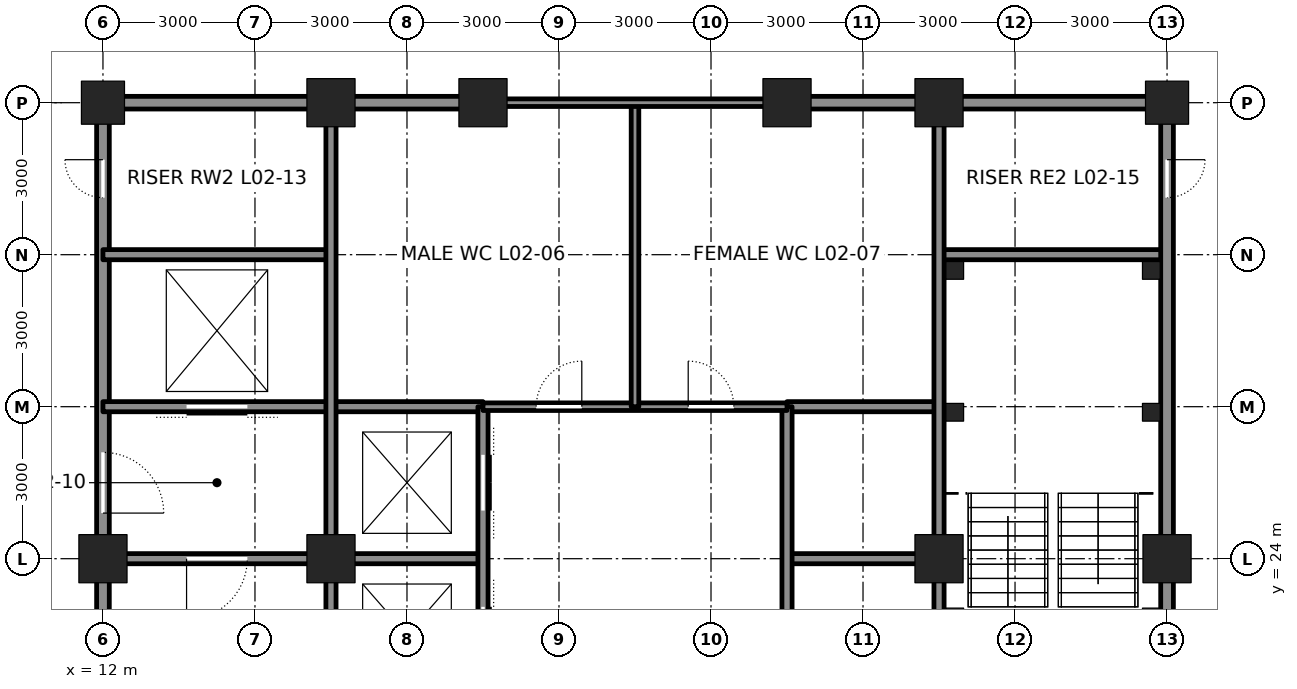
"""IFC4 building model, lengths in metres.
Left out: names, types, materials, properties, quantities, classifications, styles, units other than length and angle.
Written with IfcOpenShell. Run it as: python <this file> out.ifc"""

import sys

from ifc_helpers import new_model, si_unit, direction, frame, frame_2d, origin, origin_2d, place, context, subcontext, project, spatial, rectangle, hollow_rectangle, extrude, element, fill, save


model = new_model("IFC4")
c1 = context("Model", 3, precision=1e-05, world=origin(), true_north=direction((0.0, 1.0)))
c2 = subcontext(c1, "Body", "Model", "MODEL_VIEW")
j1 = project(units=[si_unit("LENGTHUNIT", "METRE"), si_unit("PLANEANGLEUNIT", "RADIAN")], contexts=[c1])
p1 = place(None, origin())
s1 = spatial("IfcSite", under=j1, at=p1, CompositionType="ELEMENT")
p2 = place(p1, origin())
s2 = spatial("IfcBuilding", under=s1, at=p2, CompositionType="ELEMENT")
p3 = place(p2, frame((0.0, 0.0, 13.5)))
s3 = spatial("IfcBuildingStorey", under=s2, at=p3, CompositionType="ELEMENT", Elevation=13.5)
p4 = place(p3, frame((12.0, 33.0, 0.0), z_axis=(0.0, 0.0, 1.0), x_axis=(1.0, 0.0, 0.0)))
e1 = element("IfcColumn", 1, at=p4, inside=s3, PredefinedType="COLUMN", context=c2, shape_type="SweptSolid", body=[
    extrude(hollow_rectangle(XDim=0.85, YDim=0.85, WallThickness=0.085, at=origin_2d()), origin(), (0.0, 0.0, 1.0), 6.0),
])
for number, where, z_axis, x_axis in (
    (2, (16.5, 33.0, 0.0), (0.0, 0.0, 1.0), (1.0, 0.0, 0.0)),
    (3, (19.5, 33.0, 0.0), (0.0, 0.0, 1.0), (1.0, 0.0, 0.0)),
    (4, (25.5, 33.0, 0.0), (0.0, 0.0, 1.0), (1.0, 0.0, 0.0)),
    (5, (28.5, 33.0, 0.0), (0.0, 0.0, 1.0), (1.0, 0.0, 0.0)),
):
    element("IfcColumn", number, at=place(p3, frame(where, z_axis=z_axis, x_axis=x_axis)), inside=s3, PredefinedType="COLUMN", context=c2, shape_type="SweptSolid", body=[
        extrude(hollow_rectangle(XDim=0.95, YDim=0.95, WallThickness=0.095, at=origin_2d()), origin(), (0.0, 0.0, 1.0), 6.0),
    ])
p5 = place(p3, frame((33.0, 33.0, 0.0), z_axis=(0.0, 0.0, 1.0), x_axis=(1.0, 0.0, 0.0)))
e6 = element("IfcColumn", 6, at=p5, inside=s3, PredefinedType="COLUMN", context=c2, shape_type="SweptSolid", body=[
    extrude(hollow_rectangle(XDim=0.85, YDim=0.85, WallThickness=0.085, at=origin_2d()), origin(), (0.0, 0.0, 1.0), 6.0),
])
for number, where, z_axis, x_axis in (
    (7, (12.0, 24.0, 0.0), (0.0, 0.0, 1.0), (1.0, 0.0, 0.0)),
    (8, (33.0, 24.0, 0.0), (0.0, 0.0, 1.0), (1.0, 0.0, 0.0)),
    (9, (16.5, 24.0, 0.0), (0.0, 0.0, 1.0), (1.0, 0.0, 0.0)),
    (10, (28.5, 24.0, 0.0), (0.0, 0.0, 1.0), (1.0, 0.0, 0.0)),
):
    element("IfcColumn", number, at=place(p3, frame(where, z_axis=z_axis, x_axis=x_axis)), inside=s3, PredefinedType="COLUMN", context=c2, shape_type="SweptSolid", body=[
        extrude(hollow_rectangle(XDim=0.95, YDim=0.95, WallThickness=0.095, at=origin_2d()), origin(), (0.0, 0.0, 1.0), 6.0),
    ])
p6 = place(p3, frame((12.0, 21.25, 0.0), z_axis=(0.0, 0.0, 1.0), x_axis=(0.0, 1.0, 0.0)))
e11 = element("IfcWall", 11, at=p6, inside=s3, PredefinedType="SOLIDWALL", context=c2, shape_type="SweptSolid", body=[
    extrude(rectangle(XDim=2.5, YDim=0.25, at=frame_2d((1.25, 0.0))), origin(), (0.0, 0.0, 1.0), 4.873),
])
p7 = place(p3, frame((12.0, 24.25, 0.0), z_axis=(0.0, 0.0, 1.0), x_axis=(0.0, 1.0, 0.0)))
e12 = element("IfcWall", 12, at=p7, inside=s3, PredefinedType="SOLIDWALL", context=c2, shape_type="SweptSolid", body=[
    extrude(rectangle(XDim=8.5, YDim=0.25, at=frame_2d((4.25, 0.0))), origin(), (0.0, 0.0, 1.0), 4.873),
])
p8 = place(p7, frame((0.65, 0.0, 0.0)))
e13 = element("IfcOpeningElement", 13, at=p8, cuts=e12, PredefinedType="OPENING", context=c2, shape_type="SweptSolid", body=[
    extrude(rectangle(XDim=1.2, YDim=2.1, at=frame_2d((0.6, 1.05))), frame((0.0, 0.135, 0.0), z_axis=(0.0, -1.0, 0.0), x_axis=(1.0, 0.0, 0.0)), (0.0, 0.0, 1.0), 0.27),
])
p9 = place(p7, frame((6.875, 0.0, 0.0)))
e14 = element("IfcOpeningElement", 14, at=p9, cuts=e12, PredefinedType="OPENING", context=c2, shape_type="SweptSolid", body=[
    extrude(rectangle(XDim=0.75, YDim=2.1, at=frame_2d((0.375, 1.05))), frame((0.0, 0.135, 0.0), z_axis=(0.0, -1.0, 0.0), x_axis=(1.0, 0.0, 0.0)), (0.0, 0.0, 1.0), 0.27),
])
p10 = place(p3, frame((12.25, 24.0, 0.0), z_axis=(0.0, 0.0, 1.0), x_axis=(1.0, 0.0, 0.0)))
e15 = element("IfcWall", 15, at=p10, inside=s3, PredefinedType="SOLIDWALL", context=c2, shape_type="SweptSolid", body=[
    extrude(rectangle(XDim=4.0, YDim=0.2, at=frame_2d((2.0, 0.0))), origin(), (0.0, 0.0, 1.0), 4.85),
])
p11 = place(p10, frame((1.4, 0.0, 0.0)))
e16 = element("IfcOpeningElement", 16, at=p11, cuts=e15, PredefinedType="OPENING", context=c2, shape_type="SweptSolid", body=[
    extrude(rectangle(XDim=1.2, YDim=2.1, at=frame_2d((0.6, 1.05))), frame((0.0, 0.11, 0.0), z_axis=(0.0, -1.0, 0.0), x_axis=(1.0, 0.0, 0.0)), (0.0, 0.0, 1.0), 0.22),
])
for number, where, z_axis, x_axis in (
    (17, (16.75, 24.0, 0.0), (0.0, 0.0, 1.0), (1.0, 0.0, 0.0)),
    (18, (25.5, 24.0, 0.0), (0.0, 0.0, 1.0), (1.0, 0.0, 0.0)),
):
    element("IfcWall", number, at=place(p3, frame(where, z_axis=z_axis, x_axis=x_axis)), inside=s3, PredefinedType="SOLIDWALL", context=c2, shape_type="SweptSolid", body=[
        extrude(rectangle(XDim=2.75, YDim=0.2, at=frame_2d((1.375, 0.0))), origin(), (0.0, 0.0, 1.0), 4.85),
    ])
p12 = place(p3, frame((12.0, 27.0, 0.0), z_axis=(0.0, 0.0, 1.0), x_axis=(1.0, 0.0, 0.0)))
e19 = element("IfcWall", 19, at=p12, inside=s3, PredefinedType="SOLIDWALL", context=c2, shape_type="SweptSolid", body=[
    extrude(rectangle(XDim=7.5, YDim=0.2, at=frame_2d((3.75, 0.0))), origin(), (0.0, 0.0, 1.0), 5.8),
])
p13 = place(p12, frame((1.65, 0.0, 0.0)))
e20 = element("IfcOpeningElement", 20, at=p13, cuts=e19, PredefinedType="OPENING", context=c2, shape_type="SweptSolid", body=[
    extrude(rectangle(XDim=1.2, YDim=2.1, at=frame_2d((0.6, 1.05))), frame((0.0, 0.11, 0.0), z_axis=(0.0, -1.0, 0.0), x_axis=(1.0, 0.0, 0.0)), (0.0, 0.0, 1.0), 0.22),
])
p14 = place(p3, frame((25.5, 27.0, 0.0), z_axis=(0.0, 0.0, 1.0), x_axis=(1.0, 0.0, 0.0)))
e21 = element("IfcWall", 21, at=p14, inside=s3, PredefinedType="SOLIDWALL", context=c2, shape_type="SweptSolid", body=[
    extrude(rectangle(XDim=3.0, YDim=0.2, at=frame_2d((1.5, 0.0))), origin(), (0.0, 0.0, 1.0), 5.8),
])
for number, where, z_axis, x_axis in (
    (22, (12.0, 30.0, 0.0), (0.0, 0.0, 1.0), (1.0, 0.0, 0.0)),
    (23, (28.5, 30.0, 0.0), (0.0, 0.0, 1.0), (1.0, 0.0, 0.0)),
):
    element("IfcWall", number, at=place(p3, frame(where, z_axis=z_axis, x_axis=x_axis)), inside=s3, PredefinedType="SOLIDWALL", context=c2, shape_type="SweptSolid", body=[
        extrude(rectangle(XDim=4.5, YDim=0.2, at=frame_2d((2.25, 0.0))), origin(), (0.0, 0.0, 1.0), 5.8),
    ])
p15 = place(p3, frame((12.25, 33.0, 0.0), z_axis=(0.0, 0.0, 1.0), x_axis=(1.0, 0.0, 0.0)))
e24 = element("IfcWall", 24, at=p15, inside=s3, PredefinedType="SOLIDWALL", context=c2, shape_type="SweptSolid", body=[
    extrude(rectangle(XDim=4.0, YDim=0.25, at=frame_2d((2.0, 0.0))), origin(), (0.0, 0.0, 1.0), 4.941),
])
for number, where, z_axis, x_axis in (
    (25, (16.75, 33.0, 0.0), (0.0, 0.0, 1.0), (1.0, 0.0, 0.0)),
    (26, (25.75, 33.0, 0.0), (0.0, 0.0, 1.0), (1.0, 0.0, 0.0)),
):
    element("IfcWall", number, at=place(p3, frame(where, z_axis=z_axis, x_axis=x_axis)), inside=s3, PredefinedType="SOLIDWALL", context=c2, shape_type="SweptSolid", body=[
        extrude(rectangle(XDim=2.5, YDim=0.25, at=frame_2d((1.25, 0.0))), origin(), (0.0, 0.0, 1.0), 4.941),
    ])
p16 = place(p3, frame((28.75, 33.0, 0.0), z_axis=(0.0, 0.0, 1.0), x_axis=(1.0, 0.0, 0.0)))
e27 = element("IfcWall", 27, at=p16, inside=s3, PredefinedType="SOLIDWALL", context=c2, shape_type="SweptSolid", body=[
    extrude(rectangle(XDim=4.0, YDim=0.25, at=frame_2d((2.0, 0.0))), origin(), (0.0, 0.0, 1.0), 4.941),
])
p17 = place(p3, frame((16.5, 21.25, 0.0), z_axis=(0.0, 0.0, 1.0), x_axis=(0.0, 1.0, 0.0)))
e28 = element("IfcWall", 28, at=p17, inside=s3, PredefinedType="SOLIDWALL", context=c2, shape_type="SweptSolid", body=[
    extrude(rectangle(XDim=2.5, YDim=0.2, at=frame_2d((1.25, 0.0))), origin(), (0.0, 0.0, 1.0), 4.873),
])
p18 = place(p3, frame((16.5, 24.25, 0.0), z_axis=(0.0, 0.0, 1.0), x_axis=(0.0, 1.0, 0.0)))
e29 = element("IfcWall", 29, at=p18, inside=s3, PredefinedType="SOLIDWALL", context=c2, shape_type="SweptSolid", body=[
    extrude(rectangle(XDim=8.5, YDim=0.2, at=frame_2d((4.25, 0.0))), origin(), (0.0, 0.0, 1.0), 4.873),
])
p19 = place(p3, frame((19.5, 15.0, 0.0), z_axis=(0.0, 0.0, 1.0), x_axis=(0.0, 1.0, 0.0)))
e30 = element("IfcWall", 30, at=p19, inside=s3, PredefinedType="SOLIDWALL", context=c2, shape_type="SweptSolid", body=[
    extrude(rectangle(XDim=12.0, YDim=0.2, at=frame_2d((6.0, 0.0))), origin(), (0.0, 0.0, 1.0), 4.825),
])
p20 = place(p19, frame((0.95, 0.0, 0.0)))
e31 = element("IfcOpeningElement", 31, at=p20, cuts=e30, PredefinedType="OPENING", context=c2, shape_type="SweptSolid", body=[
    extrude(rectangle(XDim=1.1, YDim=2.1, at=frame_2d((0.55, 1.05))), frame((0.0, 0.11, 0.0), z_axis=(0.0, -1.0, 0.0), x_axis=(1.0, 0.0, 0.0)), (0.0, 0.0, 1.0), 0.22),
])
p21 = place(p19, frame((3.95, 0.0, 0.0)))
e32 = element("IfcOpeningElement", 32, at=p21, cuts=e30, PredefinedType="OPENING", context=c2, shape_type="SweptSolid", body=[
    extrude(rectangle(XDim=1.1, YDim=2.1, at=frame_2d((0.55, 1.05))), frame((0.0, 0.11, 0.0), z_axis=(0.0, -1.0, 0.0), x_axis=(1.0, 0.0, 0.0)), (0.0, 0.0, 1.0), 0.22),
])
p22 = place(p19, frame((6.95, 0.0, 0.0)))
e33 = element("IfcOpeningElement", 33, at=p22, cuts=e30, PredefinedType="OPENING", context=c2, shape_type="SweptSolid", body=[
    extrude(rectangle(XDim=1.1, YDim=2.1, at=frame_2d((0.55, 1.05))), frame((0.0, 0.11, 0.0), z_axis=(0.0, -1.0, 0.0), x_axis=(1.0, 0.0, 0.0)), (0.0, 0.0, 1.0), 0.22),
])
p23 = place(p19, frame((9.95, 0.0, 0.0)))
e34 = element("IfcOpeningElement", 34, at=p23, cuts=e30, PredefinedType="OPENING", context=c2, shape_type="SweptSolid", body=[
    extrude(rectangle(XDim=1.1, YDim=2.1, at=frame_2d((0.55, 1.05))), frame((0.0, 0.11, 0.0), z_axis=(0.0, -1.0, 0.0), x_axis=(1.0, 0.0, 0.0)), (0.0, 0.0, 1.0), 0.22),
])
p24 = place(p3, frame((25.5, 15.0, 0.0), z_axis=(0.0, 0.0, 1.0), x_axis=(0.0, 1.0, 0.0)))
e35 = element("IfcWall", 35, at=p24, inside=s3, PredefinedType="SOLIDWALL", context=c2, shape_type="SweptSolid", body=[
    extrude(rectangle(XDim=12.0, YDim=0.2, at=frame_2d((6.0, 0.0))), origin(), (0.0, 0.0, 1.0), 4.825),
])
p25 = place(p3, frame((28.5, 21.25, 0.0), z_axis=(0.0, 0.0, 1.0), x_axis=(0.0, 1.0, 0.0)))
e36 = element("IfcWall", 36, at=p25, inside=s3, PredefinedType="SOLIDWALL", context=c2, shape_type="SweptSolid", body=[
    extrude(rectangle(XDim=2.5, YDim=0.2, at=frame_2d((1.25, 0.0))), origin(), (0.0, 0.0, 1.0), 4.873),
])
p26 = place(p3, frame((28.5, 24.25, 0.0), z_axis=(0.0, 0.0, 1.0), x_axis=(0.0, 1.0, 0.0)))
e37 = element("IfcWall", 37, at=p26, inside=s3, PredefinedType="SOLIDWALL", context=c2, shape_type="SweptSolid", body=[
    extrude(rectangle(XDim=8.5, YDim=0.2, at=frame_2d((4.25, 0.0))), origin(), (0.0, 0.0, 1.0), 4.873),
])
p27 = place(p3, frame((33.0, 21.25, 0.0), z_axis=(0.0, 0.0, 1.0), x_axis=(0.0, 1.0, 0.0)))
e38 = element("IfcWall", 38, at=p27, inside=s3, PredefinedType="SOLIDWALL", context=c2, shape_type="SweptSolid", body=[
    extrude(rectangle(XDim=2.5, YDim=0.25, at=frame_2d((1.25, 0.0))), origin(), (0.0, 0.0, 1.0), 4.873),
])
p28 = place(p3, frame((33.0, 24.25, 0.0), z_axis=(0.0, 0.0, 1.0), x_axis=(0.0, 1.0, 0.0)))
e39 = element("IfcWall", 39, at=p28, inside=s3, PredefinedType="SOLIDWALL", context=c2, shape_type="SweptSolid", body=[
    extrude(rectangle(XDim=8.5, YDim=0.25, at=frame_2d((4.25, 0.0))), origin(), (0.0, 0.0, 1.0), 4.873),
])
p29 = place(p28, frame((6.875, 0.0, 0.0)))
e40 = element("IfcOpeningElement", 40, at=p29, cuts=e39, PredefinedType="OPENING", context=c2, shape_type="SweptSolid", body=[
    extrude(rectangle(XDim=0.75, YDim=2.1, at=frame_2d((0.375, 1.05))), frame((0.0, 0.135, 0.0), z_axis=(0.0, -1.0, 0.0), x_axis=(1.0, 0.0, 0.0)), (0.0, 0.0, 1.0), 0.27),
])
p30 = place(p3, frame((19.5, 27.0, 0.0), z_axis=(0.0, 0.0, 1.0), x_axis=(1.0, 0.0, 0.0)))
e41 = element("IfcWall", 41, at=p30, inside=s3, PredefinedType="PARTITIONING", context=c2, shape_type="SweptSolid", body=[
    extrude(rectangle(XDim=6.0, YDim=0.15, at=frame_2d((3.0, 0.0))), origin(), (0.0, 0.0, 1.0), 5.8),
])
p31 = place(p30, frame((1.05, 0.0, 0.0)))
e42 = element("IfcOpeningElement", 42, at=p31, cuts=e41, PredefinedType="OPENING", context=c2, shape_type="SweptSolid", body=[
    extrude(rectangle(XDim=0.9, YDim=2.1, at=frame_2d((0.45, 1.05))), frame((0.0, 0.085, 0.0), z_axis=(0.0, -1.0, 0.0), x_axis=(1.0, 0.0, 0.0)), (0.0, 0.0, 1.0), 0.17),
])
p32 = place(p30, frame((4.05, 0.0, 0.0)))
e43 = element("IfcOpeningElement", 43, at=p32, cuts=e41, PredefinedType="OPENING", context=c2, shape_type="SweptSolid", body=[
    extrude(rectangle(XDim=0.9, YDim=2.1, at=frame_2d((0.45, 1.05))), frame((0.0, 0.085, 0.0), z_axis=(0.0, -1.0, 0.0), x_axis=(1.0, 0.0, 0.0)), (0.0, 0.0, 1.0), 0.17),
])
p33 = place(p3, frame((22.5, 27.0, 0.0), z_axis=(0.0, 0.0, 1.0), x_axis=(0.0, 1.0, 0.0)))
e44 = element("IfcWall", 44, at=p33, inside=s3, PredefinedType="PARTITIONING", context=c2, shape_type="SweptSolid", body=[
    extrude(rectangle(XDim=6.0, YDim=0.15, at=frame_2d((3.0, 0.0))), origin(), (0.0, 0.0, 1.0), 5.8),
])
p34 = place(p3, frame((19.5, 33.0, 0.0), z_axis=(0.0, 0.0, 1.0), x_axis=(1.0, 0.0, 0.0)))
e45 = element("IfcWall", 45, at=p34, inside=s3, PredefinedType="PARTITIONING", context=c2, shape_type="SweptSolid", body=[
    extrude(rectangle(XDim=6.0, YDim=0.15, at=frame_2d((3.0, 0.0))), origin(), (0.0, 0.0, 1.0), 4.941),
])
for number, where, z_axis, x_axis in (
    (46, (28.81, 29.69, 0.0), (0.0, 0.0, 1.0), (1.0, 0.0, 0.0)),
    (47, (32.69, 29.69, 0.0), (0.0, 0.0, 1.0), (1.0, 0.0, 0.0)),
    (48, (28.81, 26.89, 0.0), (0.0, 0.0, 1.0), (1.0, 0.0, 0.0)),
    (49, (32.69, 26.89, 0.0), (0.0, 0.0, 1.0), (1.0, 0.0, 0.0)),
    (50, (28.81, 22.85, 0.0), (0.0, 0.0, 1.0), (1.0, 0.0, 0.0)),
    (51, (32.69, 22.85, 0.0), (0.0, 0.0, 1.0), (1.0, 0.0, 0.0)),
):
    element("IfcColumn", number, at=place(p3, frame(where, z_axis=z_axis, x_axis=x_axis)), inside=s3, PredefinedType="COLUMN", context=c2, shape_type="SweptSolid", body=[
        extrude(hollow_rectangle(XDim=0.35, YDim=0.35, WallThickness=0.035, at=origin_2d()), origin(), (0.0, 0.0, 1.0), 6.0),
    ])
p35 = place(p11, frame((1.2, 0.0, 0.0), z_axis=(0.0, 0.0, 1.0), x_axis=(-1.0, 0.0, 0.0)))
e52 = element("IfcDoor", 52, at=p35, inside=s3, OperationType="SINGLE_SWING_RIGHT", PredefinedType="DOOR", context=c2, shape_type="SweptSolid", body=[
    extrude(rectangle(XDim=1.2, YDim=2.1, at=frame_2d((0.6, 1.05))), frame((0.0, 0.025, 0.0), z_axis=(0.0, -1.0, 0.0), x_axis=(1.0, 0.0, 0.0)), (0.0, 0.0, 1.0), 0.05),
])
fill(e16, e52)
p36 = place(p8, frame((1.2, 0.0, 0.0), z_axis=(0.0, 0.0, 1.0), x_axis=(-1.0, 0.0, 0.0)))
e53 = element("IfcDoor", 53, at=p36, inside=s3, OperationType="SINGLE_SWING_RIGHT", PredefinedType="DOOR", context=c2, shape_type="SweptSolid", body=[
    extrude(rectangle(XDim=1.2, YDim=2.1, at=frame_2d((0.6, 1.05))), frame((0.0, 0.025, 0.0), z_axis=(0.0, -1.0, 0.0), x_axis=(1.0, 0.0, 0.0)), (0.0, 0.0, 1.0), 0.05),
])
fill(e13, e53)
p37 = place(p13, origin())
e54 = element("IfcDoor", 54, at=p37, inside=s3, OperationType="DOUBLE_DOOR_SLIDING", PredefinedType="DOOR", context=c2, shape_type="SweptSolid", body=[
    extrude(rectangle(XDim=1.2, YDim=2.1, at=frame_2d((0.6, 1.05))), frame((0.0, 0.025, 0.0), z_axis=(0.0, -1.0, 0.0), x_axis=(1.0, 0.0, 0.0)), (0.0, 0.0, 1.0), 0.05),
])
fill(e20, e54)
p38 = place(p9, origin())
e55 = element("IfcDoor", 55, at=p38, inside=s3, OperationType="SINGLE_SWING_RIGHT", PredefinedType="DOOR", context=c2, shape_type="SweptSolid", body=[
    extrude(rectangle(XDim=0.75, YDim=2.1, at=frame_2d((0.375, 1.05))), frame((0.0, 0.025, 0.0), z_axis=(0.0, -1.0, 0.0), x_axis=(1.0, 0.0, 0.0)), (0.0, 0.0, 1.0), 0.05),
])
fill(e14, e55)
p39 = place(p29, frame((0.75, 0.0, 0.0), z_axis=(0.0, 0.0, 1.0), x_axis=(-1.0, 0.0, 0.0)))
e56 = element("IfcDoor", 56, at=p39, inside=s3, OperationType="SINGLE_SWING_LEFT", PredefinedType="DOOR", context=c2, shape_type="SweptSolid", body=[
    extrude(rectangle(XDim=0.75, YDim=2.1, at=frame_2d((0.375, 1.05))), frame((0.0, 0.025, 0.0), z_axis=(0.0, -1.0, 0.0), x_axis=(1.0, 0.0, 0.0)), (0.0, 0.0, 1.0), 0.05),
])
fill(e40, e56)
p40 = place(p31, origin())
e57 = element("IfcDoor", 57, at=p40, inside=s3, OperationType="SINGLE_SWING_RIGHT", PredefinedType="DOOR", context=c2, shape_type="SweptSolid", body=[
    extrude(rectangle(XDim=0.9, YDim=2.1, at=frame_2d((0.45, 1.05))), frame((0.0, 0.025, 0.0), z_axis=(0.0, -1.0, 0.0), x_axis=(1.0, 0.0, 0.0)), (0.0, 0.0, 1.0), 0.05),
])
fill(e42, e57)
p41 = place(p32, origin())
e58 = element("IfcDoor", 58, at=p41, inside=s3, OperationType="SINGLE_SWING_LEFT", PredefinedType="DOOR", context=c2, shape_type="SweptSolid", body=[
    extrude(rectangle(XDim=0.9, YDim=2.1, at=frame_2d((0.45, 1.05))), frame((0.0, 0.025, 0.0), z_axis=(0.0, -1.0, 0.0), x_axis=(1.0, 0.0, 0.0)), (0.0, 0.0, 1.0), 0.05),
])
fill(e43, e58)
p42 = place(p22, origin())
e59 = element("IfcDoor", 59, at=p42, inside=s3, OperationType="DOUBLE_DOOR_SLIDING", PredefinedType="DOOR", context=c2, shape_type="SweptSolid", body=[
    extrude(rectangle(XDim=1.1, YDim=2.1, at=frame_2d((0.55, 1.05))), frame((0.0, 0.025, 0.0), z_axis=(0.0, -1.0, 0.0), x_axis=(1.0, 0.0, 0.0)), (0.0, 0.0, 1.0), 0.05),
])
fill(e33, e59)
p43 = place(p23, origin())
e60 = element("IfcDoor", 60, at=p43, inside=s3, OperationType="DOUBLE_DOOR_SLIDING", PredefinedType="DOOR", context=c2, shape_type="SweptSolid", body=[
    extrude(rectangle(XDim=1.1, YDim=2.1, at=frame_2d((0.55, 1.05))), frame((0.0, 0.025, 0.0), z_axis=(0.0, -1.0, 0.0), x_axis=(1.0, 0.0, 0.0)), (0.0, 0.0, 1.0), 0.05),
])
fill(e34, e60)
save(model, sys.argv[1])
